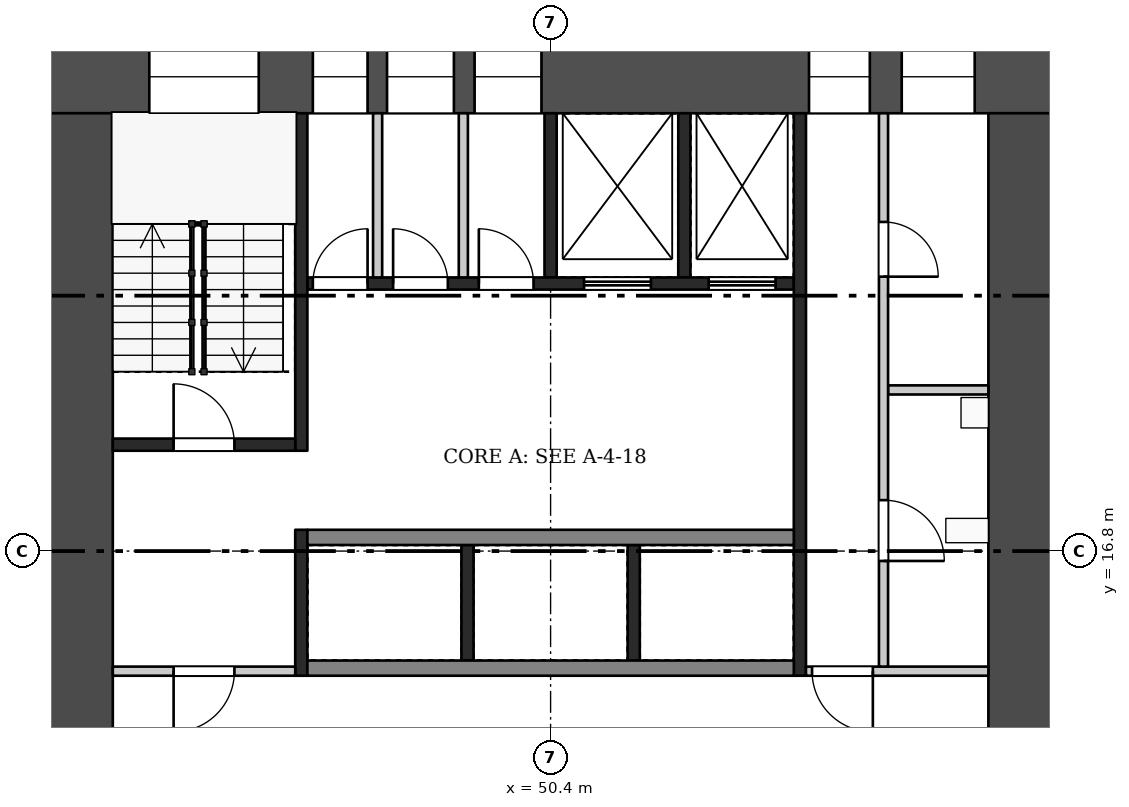
"""IFC4 building model, lengths in metres.
Left out: names, types, materials, properties, quantities, classifications, styles, units other than length and angle.
Written with IfcOpenShell. Run it as: python <this file> out.ifc"""

import sys

from ifc_helpers import new_model, si_unit, direction, frame, frame_2d, origin, place, context, subcontext, project, spatial, rectangle, extrude, element, fill, save


model = new_model("IFC4")
c1 = context("Model", 3, precision=1e-05, world=origin(), true_north=direction((0.0, 1.0)))
c2 = subcontext(c1, "Body", "Model", "MODEL_VIEW")
j1 = project(units=[si_unit("LENGTHUNIT", "METRE"), si_unit("PLANEANGLEUNIT", "RADIAN")], contexts=[c1])
p1 = place(None, origin())
s1 = spatial("IfcSite", under=j1, at=p1, CompositionType="ELEMENT")
p2 = place(p1, origin())
s2 = spatial("IfcBuilding", under=s1, at=p2, CompositionType="ELEMENT")
p3 = place(p2, frame((0.0, 0.0, 112.7)))
s3 = spatial("IfcBuildingStorey", under=s2, at=p3, CompositionType="ELEMENT", Elevation=112.7)
p4 = place(p3, frame((42.0, 24.6, 0.0), z_axis=(0.0, 0.0, 1.0), x_axis=(1.0, 0.0, 0.0)))
e1 = element("IfcWall", 1, at=p4, inside=s3, PredefinedType="SHEAR", context=c2, shape_type="SweptSolid", body=[
    extrude(rectangle(XDim=16.8, YDim=1.2, at=frame_2d((8.4, 0.0))), origin(), (0.0, 0.0, 1.0), 3.22),
])
p5 = place(p4, frame((1.8, 0.0, 0.5)))
e2 = element("IfcOpeningElement", 2, at=p5, cuts=e1, PredefinedType="OPENING", context=c2, shape_type="SweptSolid", body=[
    extrude(rectangle(XDim=1.8, YDim=2.4, at=frame_2d((0.9, 1.2))), frame((0.0, 0.61, 0.0), z_axis=(0.0, -1.0, 0.0), x_axis=(1.0, 0.0, 0.0)), (0.0, 0.0, 1.0), 1.22),
])
p6 = place(p4, frame((4.49, 0.0, 1.6)))
e3 = element("IfcOpeningElement", 3, at=p6, cuts=e1, PredefinedType="OPENING", context=c2, shape_type="SweptSolid", body=[
    extrude(rectangle(XDim=0.9, YDim=1.2, at=frame_2d((0.45, 0.6))), frame((0.0, 0.61, 0.0), z_axis=(0.0, -1.0, 0.0), x_axis=(1.0, 0.0, 0.0)), (0.0, 0.0, 1.0), 1.22),
])
p7 = place(p4, frame((5.71, 0.0, 1.6)))
e4 = element("IfcOpeningElement", 4, at=p7, cuts=e1, PredefinedType="OPENING", context=c2, shape_type="SweptSolid", body=[
    extrude(rectangle(XDim=1.1, YDim=1.2, at=frame_2d((0.55, 0.6))), frame((0.0, 0.61, 0.0), z_axis=(0.0, -1.0, 0.0), x_axis=(1.0, 0.0, 0.0)), (0.0, 0.0, 1.0), 1.22),
])
p8 = place(p4, frame((7.15, 0.0, 1.6)))
e5 = element("IfcOpeningElement", 5, at=p8, cuts=e1, PredefinedType="OPENING", context=c2, shape_type="SweptSolid", body=[
    extrude(rectangle(XDim=1.1, YDim=1.2, at=frame_2d((0.55, 0.6))), frame((0.0, 0.61, 0.0), z_axis=(0.0, -1.0, 0.0), x_axis=(1.0, 0.0, 0.0)), (0.0, 0.0, 1.0), 1.22),
])
p9 = place(p4, frame((12.65, 0.0, 0.6)))
e6 = element("IfcOpeningElement", 6, at=p9, cuts=e1, PredefinedType="OPENING", context=c2, shape_type="SweptSolid", body=[
    extrude(rectangle(XDim=1.0, YDim=2.1, at=frame_2d((0.5, 1.05))), frame((0.0, 0.61, 0.0), z_axis=(0.0, -1.0, 0.0), x_axis=(1.0, 0.0, 0.0)), (0.0, 0.0, 1.0), 1.22),
])
p10 = place(p4, frame((14.175, 0.0, 1.6)))
e7 = element("IfcOpeningElement", 7, at=p10, cuts=e1, PredefinedType="OPENING", context=c2, shape_type="SweptSolid", body=[
    extrude(rectangle(XDim=1.2, YDim=1.2, at=frame_2d((0.6, 0.6))), frame((0.0, 0.61, 0.0), z_axis=(0.0, -1.0, 0.0), x_axis=(1.0, 0.0, 0.0)), (0.0, 0.0, 1.0), 1.22),
])
p11 = place(p3, frame((42.6, 9.6, 0.0), z_axis=(0.0, 0.0, 1.0), x_axis=(0.0, 1.0, 0.0)))
e8 = element("IfcWall", 8, at=p11, inside=s3, PredefinedType="SHEAR", context=c2, shape_type="SweptSolid", body=[
    extrude(rectangle(XDim=14.4, YDim=1.2, at=frame_2d((7.2, 0.0))), origin(), (0.0, 0.0, 1.0), 3.22),
])
p12 = place(p11, frame((2.1, 0.0, 0.0)))
e9 = element("IfcOpeningElement", 9, at=p12, cuts=e8, PredefinedType="OPENING", context=c2, shape_type="SweptSolid", body=[
    extrude(rectangle(XDim=1.8, YDim=2.1, at=frame_2d((0.9, 1.05))), frame((0.0, 0.61, 0.0), z_axis=(0.0, -1.0, 0.0), x_axis=(1.0, 0.0, 0.0)), (0.0, 0.0, 1.0), 1.22),
])
p13 = place(p3, frame((58.2, 9.6, 0.0), z_axis=(0.0, 0.0, 1.0), x_axis=(0.0, 1.0, 0.0)))
e10 = element("IfcWall", 10, at=p13, inside=s3, PredefinedType="SHEAR", context=c2, shape_type="SweptSolid", body=[
    extrude(rectangle(XDim=14.4, YDim=1.2, at=frame_2d((7.2, 0.0))), origin(), (0.0, 0.0, 1.0), 3.22),
])
p14 = place(p13, frame((2.1, 0.0, 0.0)))
e11 = element("IfcOpeningElement", 11, at=p14, cuts=e10, PredefinedType="OPENING", context=c2, shape_type="SweptSolid", body=[
    extrude(rectangle(XDim=1.8, YDim=2.1, at=frame_2d((0.9, 1.05))), frame((0.0, 0.61, 0.0), z_axis=(0.0, -1.0, 0.0), x_axis=(1.0, 0.0, 0.0)), (0.0, 0.0, 1.0), 1.22),
])
for number, where, z_axis, x_axis in (
    (12, (49.033, 15.0, 0.0), (0.0, 0.0, 1.0), (0.0, 1.0, 0.0)),
    (13, (51.767, 15.0, 0.0), (0.0, 0.0, 1.0), (0.0, 1.0, 0.0)),
):
    element("IfcWall", number, at=place(p3, frame(where, z_axis=z_axis, x_axis=x_axis)), inside=s3, PredefinedType="SHEAR", context=c2, shape_type="SweptSolid", body=[
        extrude(rectangle(XDim=1.9, YDim=0.2, at=frame_2d((0.95, 0.0))), origin(), (0.0, 0.0, 1.0), 3.22),
    ])
for number, where, z_axis, x_axis in (
    (14, (46.4, 14.875, 0.0), (0.0, 0.0, 1.0), (1.0, 0.0, 0.0)),
    (15, (46.4, 17.025, 0.0), (0.0, 0.0, 1.0), (1.0, 0.0, 0.0)),
):
    element("IfcWall", number, at=place(p3, frame(where, z_axis=z_axis, x_axis=x_axis)), inside=s3, PredefinedType="SHEAR", context=c2, shape_type="SweptSolid", body=[
        extrude(rectangle(XDim=8.0, YDim=0.25, at=frame_2d((4.0, 0.0))), origin(), (0.0, 0.0, 1.0), 3.22),
    ])
for number, where, z_axis, x_axis in (
    (16, (50.4, 21.3, 0.0), (0.0, 0.0, 1.0), (0.0, 1.0, 0.0)),
    (17, (52.6, 21.3, 0.0), (0.0, 0.0, 1.0), (0.0, 1.0, 0.0)),
):
    element("IfcWall", number, at=place(p3, frame(where, z_axis=z_axis, x_axis=x_axis)), inside=s3, PredefinedType="SHEAR", context=c2, shape_type="SweptSolid", body=[
        extrude(rectangle(XDim=2.7, YDim=0.2, at=frame_2d((1.35, 0.0))), origin(), (0.0, 0.0, 1.0), 3.22),
    ])
for number, where, z_axis, x_axis in (
    (18, (47.555, 21.3, 0.0), (0.0, 0.0, 1.0), (0.0, 1.0, 0.0)),
    (19, (48.965, 21.3, 0.0), (0.0, 0.0, 1.0), (0.0, 1.0, 0.0)),
):
    element("IfcWall", number, at=place(p3, frame(where, z_axis=z_axis, x_axis=x_axis)), inside=s3, PredefinedType="PARTITIONING", context=c2, shape_type="SweptSolid", body=[
        extrude(rectangle(XDim=2.7, YDim=0.15, at=frame_2d((1.35, 0.0))), origin(), (0.0, 0.0, 1.0), 3.22),
    ])
p15 = place(p3, frame((46.4, 21.2, 0.0), z_axis=(0.0, 0.0, 1.0), x_axis=(1.0, 0.0, 0.0)))
e20 = element("IfcWall", 20, at=p15, inside=s3, PredefinedType="SHEAR", context=c2, shape_type="SweptSolid", body=[
    extrude(rectangle(XDim=8.0, YDim=0.2, at=frame_2d((4.0, 0.0))), origin(), (0.0, 0.0, 1.0), 3.22),
])
p16 = place(p15, frame((0.09, 0.0, 0.0)))
e21 = element("IfcOpeningElement", 21, at=p16, cuts=e20, PredefinedType="OPENING", context=c2, shape_type="SweptSolid", body=[
    extrude(rectangle(XDim=0.9, YDim=2.1, at=frame_2d((0.45, 1.05))), frame((0.0, 0.11, 0.0), z_axis=(0.0, -1.0, 0.0), x_axis=(1.0, 0.0, 0.0)), (0.0, 0.0, 1.0), 0.22),
])
p17 = place(p15, frame((1.41, 0.0, 0.0)))
e22 = element("IfcOpeningElement", 22, at=p17, cuts=e20, PredefinedType="OPENING", context=c2, shape_type="SweptSolid", body=[
    extrude(rectangle(XDim=0.9, YDim=2.1, at=frame_2d((0.45, 1.05))), frame((0.0, 0.11, 0.0), z_axis=(0.0, -1.0, 0.0), x_axis=(1.0, 0.0, 0.0)), (0.0, 0.0, 1.0), 0.22),
])
p18 = place(p15, frame((2.82, 0.0, 0.0)))
e23 = element("IfcOpeningElement", 23, at=p18, cuts=e20, PredefinedType="OPENING", context=c2, shape_type="SweptSolid", body=[
    extrude(rectangle(XDim=0.9, YDim=2.1, at=frame_2d((0.45, 1.05))), frame((0.0, 0.11, 0.0), z_axis=(0.0, -1.0, 0.0), x_axis=(1.0, 0.0, 0.0)), (0.0, 0.0, 1.0), 0.22),
])
p19 = place(p15, frame((4.55, 0.0, 0.0)))
e24 = element("IfcOpeningElement", 24, at=p19, cuts=e20, PredefinedType="OPENING", context=c2, shape_type="SweptSolid", body=[
    extrude(rectangle(XDim=1.1, YDim=2.1, at=frame_2d((0.55, 1.05))), frame((0.0, 0.11, 0.0), z_axis=(0.0, -1.0, 0.0), x_axis=(1.0, 0.0, 0.0)), (0.0, 0.0, 1.0), 0.22),
])
p20 = place(p15, frame((6.6, 0.0, 0.0)))
e25 = element("IfcOpeningElement", 25, at=p20, cuts=e20, PredefinedType="OPENING", context=c2, shape_type="SweptSolid", body=[
    extrude(rectangle(XDim=1.1, YDim=2.1, at=frame_2d((0.55, 1.05))), frame((0.0, 0.11, 0.0), z_axis=(0.0, -1.0, 0.0), x_axis=(1.0, 0.0, 0.0)), (0.0, 0.0, 1.0), 0.22),
])
p21 = place(p3, frame((46.3, 14.75, 0.0), z_axis=(0.0, 0.0, 1.0), x_axis=(0.0, 1.0, 0.0)))
e26 = element("IfcWall", 26, at=p21, inside=s3, PredefinedType="SHEAR", context=c2, shape_type="SweptSolid", body=[
    extrude(rectangle(XDim=2.4, YDim=0.2, at=frame_2d((1.2, 0.0))), origin(), (0.0, 0.0, 1.0), 3.22),
])
p22 = place(p3, frame((46.3, 18.45, 0.0), z_axis=(0.0, 0.0, 1.0), x_axis=(0.0, 1.0, 0.0)))
e27 = element("IfcWall", 27, at=p22, inside=s3, PredefinedType="SHEAR", context=c2, shape_type="SweptSolid", body=[
    extrude(rectangle(XDim=5.55, YDim=0.2, at=frame_2d((2.775, 0.0))), origin(), (0.0, 0.0, 1.0), 3.22),
])
p23 = place(p3, frame((43.2, 14.825, 0.0), z_axis=(0.0, 0.0, 1.0), x_axis=(1.0, 0.0, 0.0)))
e28 = element("IfcWall", 28, at=p23, inside=s3, PredefinedType="PARTITIONING", context=c2, shape_type="SweptSolid", body=[
    extrude(rectangle(XDim=3.0, YDim=0.15, at=frame_2d((1.5, 0.0))), origin(), (0.0, 0.0, 1.0), 3.22),
])
p24 = place(p23, frame((1.0, 0.0, 0.0)))
e29 = element("IfcOpeningElement", 29, at=p24, cuts=e28, PredefinedType="OPENING", context=c2, shape_type="SweptSolid", body=[
    extrude(rectangle(XDim=1.0, YDim=2.1, at=frame_2d((0.5, 1.05))), frame((0.0, 0.085, 0.0), z_axis=(0.0, -1.0, 0.0), x_axis=(1.0, 0.0, 0.0)), (0.0, 0.0, 1.0), 0.17),
])
p25 = place(p3, frame((43.2, 18.55, 0.0), z_axis=(0.0, 0.0, 1.0), x_axis=(1.0, 0.0, 0.0)))
e30 = element("IfcWall", 30, at=p25, inside=s3, PredefinedType="SHEAR", context=c2, shape_type="SweptSolid", body=[
    extrude(rectangle(XDim=3.0, YDim=0.2, at=frame_2d((1.5, 0.0))), origin(), (0.0, 0.0, 1.0), 3.22),
])
p26 = place(p25, frame((1.0, 0.0, 0.0)))
e31 = element("IfcOpeningElement", 31, at=p26, cuts=e30, PredefinedType="OPENING", context=c2, shape_type="SweptSolid", body=[
    extrude(rectangle(XDim=1.0, YDim=2.1, at=frame_2d((0.5, 1.05))), frame((0.0, 0.11, 0.0), z_axis=(0.0, -1.0, 0.0), x_axis=(1.0, 0.0, 0.0)), (0.0, 0.0, 1.0), 0.22),
])
p27 = place(p3, frame((54.5, 14.75, 0.0), z_axis=(0.0, 0.0, 1.0), x_axis=(0.0, 1.0, 0.0)))
e32 = element("IfcWall", 32, at=p27, inside=s3, PredefinedType="SHEAR", context=c2, shape_type="SweptSolid", body=[
    extrude(rectangle(XDim=9.25, YDim=0.2, at=frame_2d((4.625, 0.0))), origin(), (0.0, 0.0, 1.0), 3.22),
])
p28 = place(p3, frame((54.6, 14.825, 0.0), z_axis=(0.0, 0.0, 1.0), x_axis=(1.0, 0.0, 0.0)))
e33 = element("IfcWall", 33, at=p28, inside=s3, PredefinedType="PARTITIONING", context=c2, shape_type="SweptSolid", body=[
    extrude(rectangle(XDim=3.0, YDim=0.15, at=frame_2d((1.5, 0.0))), origin(), (0.0, 0.0, 1.0), 3.22),
])
p29 = place(p28, frame((0.1, 0.0, 0.0)))
e34 = element("IfcOpeningElement", 34, at=p29, cuts=e33, PredefinedType="OPENING", context=c2, shape_type="SweptSolid", body=[
    extrude(rectangle(XDim=1.0, YDim=2.1, at=frame_2d((0.5, 1.05))), frame((0.0, 0.085, 0.0), z_axis=(0.0, -1.0, 0.0), x_axis=(1.0, 0.0, 0.0)), (0.0, 0.0, 1.0), 0.17),
])
p30 = place(p3, frame((55.95, 19.45, 0.0), z_axis=(0.0, 0.0, 1.0), x_axis=(1.0, 0.0, 0.0)))
e35 = element("IfcWall", 35, at=p30, inside=s3, PredefinedType="PARTITIONING", context=c2, shape_type="SweptSolid", body=[
    extrude(rectangle(XDim=1.65, YDim=0.15, at=frame_2d((0.825, 0.0))), origin(), (0.0, 0.0, 1.0), 3.22),
])
p31 = place(p3, frame((55.875, 14.9, 0.0), z_axis=(0.0, 0.0, 1.0), x_axis=(0.0, 1.0, 0.0)))
e36 = element("IfcWall", 36, at=p31, inside=s3, PredefinedType="PARTITIONING", context=c2, shape_type="SweptSolid", body=[
    extrude(rectangle(XDim=9.1, YDim=0.15, at=frame_2d((4.55, 0.0))), origin(), (0.0, 0.0, 1.0), 3.22),
])
p32 = place(p31, frame((1.738, 0.0, 0.0)))
e37 = element("IfcOpeningElement", 37, at=p32, cuts=e36, PredefinedType="OPENING", context=c2, shape_type="SweptSolid", body=[
    extrude(rectangle(XDim=1.0, YDim=2.1, at=frame_2d((0.5, 1.05))), frame((0.0, 0.085, 0.0), z_axis=(0.0, -1.0, 0.0), x_axis=(1.0, 0.0, 0.0)), (0.0, 0.0, 1.0), 0.17),
])
p33 = place(p31, frame((6.413, 0.0, 0.0)))
e38 = element("IfcOpeningElement", 38, at=p33, cuts=e36, PredefinedType="OPENING", context=c2, shape_type="SweptSolid", body=[
    extrude(rectangle(XDim=0.9, YDim=2.1, at=frame_2d((0.45, 1.05))), frame((0.0, 0.085, 0.0), z_axis=(0.0, -1.0, 0.0), x_axis=(1.0, 0.0, 0.0)), (0.0, 0.0, 1.0), 0.17),
])
p34 = place(p16, origin())
e39 = element("IfcDoor", 39, at=p34, inside=s3, OperationType="SINGLE_SWING_RIGHT", PredefinedType="DOOR", context=c2, shape_type="SweptSolid", body=[
    extrude(rectangle(XDim=0.9, YDim=2.1, at=frame_2d((0.45, 1.05))), frame((0.0, 0.025, 0.0), z_axis=(0.0, -1.0, 0.0), x_axis=(1.0, 0.0, 0.0)), (0.0, 0.0, 1.0), 0.05),
])
fill(e21, e39)
p35 = place(p17, origin())
e40 = element("IfcDoor", 40, at=p35, inside=s3, OperationType="SINGLE_SWING_LEFT", PredefinedType="DOOR", context=c2, shape_type="SweptSolid", body=[
    extrude(rectangle(XDim=0.9, YDim=2.1, at=frame_2d((0.45, 1.05))), frame((0.0, 0.025, 0.0), z_axis=(0.0, -1.0, 0.0), x_axis=(1.0, 0.0, 0.0)), (0.0, 0.0, 1.0), 0.05),
])
fill(e22, e40)
p36 = place(p18, origin())
e41 = element("IfcDoor", 41, at=p36, inside=s3, OperationType="SINGLE_SWING_LEFT", PredefinedType="DOOR", context=c2, shape_type="SweptSolid", body=[
    extrude(rectangle(XDim=0.9, YDim=2.1, at=frame_2d((0.45, 1.05))), frame((0.0, 0.025, 0.0), z_axis=(0.0, -1.0, 0.0), x_axis=(1.0, 0.0, 0.0)), (0.0, 0.0, 1.0), 0.05),
])
fill(e23, e41)
p37 = place(p19, origin())
e42 = element("IfcDoor", 42, at=p37, inside=s3, OperationType="DOUBLE_DOOR_SLIDING", PredefinedType="DOOR", context=c2, shape_type="SweptSolid", body=[
    extrude(rectangle(XDim=1.1, YDim=2.1, at=frame_2d((0.55, 1.05))), frame((0.0, 0.025, 0.0), z_axis=(0.0, -1.0, 0.0), x_axis=(1.0, 0.0, 0.0)), (0.0, 0.0, 1.0), 0.05),
])
fill(e24, e42)
p38 = place(p20, origin())
e43 = element("IfcDoor", 43, at=p38, inside=s3, OperationType="DOUBLE_DOOR_SLIDING", PredefinedType="DOOR", context=c2, shape_type="SweptSolid", body=[
    extrude(rectangle(XDim=1.1, YDim=2.1, at=frame_2d((0.55, 1.05))), frame((0.0, 0.025, 0.0), z_axis=(0.0, -1.0, 0.0), x_axis=(1.0, 0.0, 0.0)), (0.0, 0.0, 1.0), 0.05),
])
fill(e25, e43)
p39 = place(p24, frame((1.0, 0.0, 0.0), z_axis=(0.0, 0.0, 1.0), x_axis=(-1.0, 0.0, 0.0)))
e44 = element("IfcDoor", 44, at=p39, inside=s3, OperationType="SINGLE_SWING_RIGHT", PredefinedType="DOOR", context=c2, shape_type="SweptSolid", body=[
    extrude(rectangle(XDim=1.0, YDim=2.1, at=frame_2d((0.5, 1.05))), frame((0.0, 0.025, 0.0), z_axis=(0.0, -1.0, 0.0), x_axis=(1.0, 0.0, 0.0)), (0.0, 0.0, 1.0), 0.05),
])
fill(e29, e44)
p40 = place(p26, origin())
e45 = element("IfcDoor", 45, at=p40, inside=s3, OperationType="SINGLE_SWING_LEFT", PredefinedType="DOOR", context=c2, shape_type="SweptSolid", body=[
    extrude(rectangle(XDim=1.0, YDim=2.1, at=frame_2d((0.5, 1.05))), frame((0.0, 0.025, 0.0), z_axis=(0.0, -1.0, 0.0), x_axis=(1.0, 0.0, 0.0)), (0.0, 0.0, 1.0), 0.05),
])
fill(e31, e45)
p41 = place(p29, frame((1.0, 0.0, 0.0), z_axis=(0.0, 0.0, 1.0), x_axis=(-1.0, 0.0, 0.0)))
e46 = element("IfcDoor", 46, at=p41, inside=s3, OperationType="SINGLE_SWING_LEFT", PredefinedType="DOOR", context=c2, shape_type="SweptSolid", body=[
    extrude(rectangle(XDim=1.0, YDim=2.1, at=frame_2d((0.5, 1.05))), frame((0.0, 0.025, 0.0), z_axis=(0.0, -1.0, 0.0), x_axis=(1.0, 0.0, 0.0)), (0.0, 0.0, 1.0), 0.05),
])
fill(e34, e46)
p42 = place(p32, frame((1.0, 0.0, 0.0), z_axis=(0.0, 0.0, 1.0), x_axis=(-1.0, 0.0, 0.0)))
e47 = element("IfcDoor", 47, at=p42, inside=s3, OperationType="SINGLE_SWING_RIGHT", PredefinedType="DOOR", context=c2, shape_type="SweptSolid", body=[
    extrude(rectangle(XDim=1.0, YDim=2.1, at=frame_2d((0.5, 1.05))), frame((0.0, 0.025, 0.0), z_axis=(0.0, -1.0, 0.0), x_axis=(1.0, 0.0, 0.0)), (0.0, 0.0, 1.0), 0.05),
])
fill(e37, e47)
p43 = place(p33, frame((0.9, 0.0, 0.0), z_axis=(0.0, 0.0, 1.0), x_axis=(-1.0, 0.0, 0.0)))
e48 = element("IfcDoor", 48, at=p43, inside=s3, OperationType="SINGLE_SWING_RIGHT", PredefinedType="DOOR", context=c2, shape_type="SweptSolid", body=[
    extrude(rectangle(XDim=0.9, YDim=2.1, at=frame_2d((0.45, 1.05))), frame((0.0, 0.025, 0.0), z_axis=(0.0, -1.0, 0.0), x_axis=(1.0, 0.0, 0.0)), (0.0, 0.0, 1.0), 0.05),
])
fill(e38, e48)
p44 = place(p5, origin())
e49 = element("IfcWindow", 49, at=p44, inside=s3, PartitioningType="SINGLE_PANEL", PredefinedType="WINDOW", context=c2, shape_type="SweptSolid", body=[
    extrude(rectangle(XDim=1.8, YDim=2.4, at=frame_2d((0.9, 1.2))), frame((0.0, 0.03, 0.0), z_axis=(0.0, -1.0, 0.0), x_axis=(1.0, 0.0, 0.0)), (0.0, 0.0, 1.0), 0.06),
])
fill(e2, e49)
p45 = place(p6, origin())
e50 = element("IfcWindow", 50, at=p45, inside=s3, PartitioningType="SINGLE_PANEL", PredefinedType="WINDOW", context=c2, shape_type="SweptSolid", body=[
    extrude(rectangle(XDim=0.9, YDim=1.2, at=frame_2d((0.45, 0.6))), frame((0.0, 0.03, 0.0), z_axis=(0.0, -1.0, 0.0), x_axis=(1.0, 0.0, 0.0)), (0.0, 0.0, 1.0), 0.06),
])
fill(e3, e50)
p46 = place(p7, origin())
e51 = element("IfcWindow", 51, at=p46, inside=s3, PartitioningType="SINGLE_PANEL", PredefinedType="WINDOW", context=c2, shape_type="SweptSolid", body=[
    extrude(rectangle(XDim=1.1, YDim=1.2, at=frame_2d((0.55, 0.6))), frame((0.0, 0.03, 0.0), z_axis=(0.0, -1.0, 0.0), x_axis=(1.0, 0.0, 0.0)), (0.0, 0.0, 1.0), 0.06),
])
fill(e4, e51)
p47 = place(p8, origin())
e52 = element("IfcWindow", 52, at=p47, inside=s3, PartitioningType="SINGLE_PANEL", PredefinedType="WINDOW", context=c2, shape_type="SweptSolid", body=[
    extrude(rectangle(XDim=1.1, YDim=1.2, at=frame_2d((0.55, 0.6))), frame((0.0, 0.03, 0.0), z_axis=(0.0, -1.0, 0.0), x_axis=(1.0, 0.0, 0.0)), (0.0, 0.0, 1.0), 0.06),
])
fill(e5, e52)
p48 = place(p9, origin())
e53 = element("IfcWindow", 53, at=p48, inside=s3, PartitioningType="SINGLE_PANEL", PredefinedType="WINDOW", context=c2, shape_type="SweptSolid", body=[
    extrude(rectangle(XDim=1.0, YDim=2.1, at=frame_2d((0.5, 1.05))), frame((0.0, 0.03, 0.0), z_axis=(0.0, -1.0, 0.0), x_axis=(1.0, 0.0, 0.0)), (0.0, 0.0, 1.0), 0.06),
])
fill(e6, e53)
p49 = place(p10, origin())
e54 = element("IfcWindow", 54, at=p49, inside=s3, PartitioningType="SINGLE_PANEL", PredefinedType="WINDOW", context=c2, shape_type="SweptSolid", body=[
    extrude(rectangle(XDim=1.2, YDim=1.2, at=frame_2d((0.6, 0.6))), frame((0.0, 0.03, 0.0), z_axis=(0.0, -1.0, 0.0), x_axis=(1.0, 0.0, 0.0)), (0.0, 0.0, 1.0), 0.06),
])
fill(e7, e54)
save(model, sys.argv[1])
